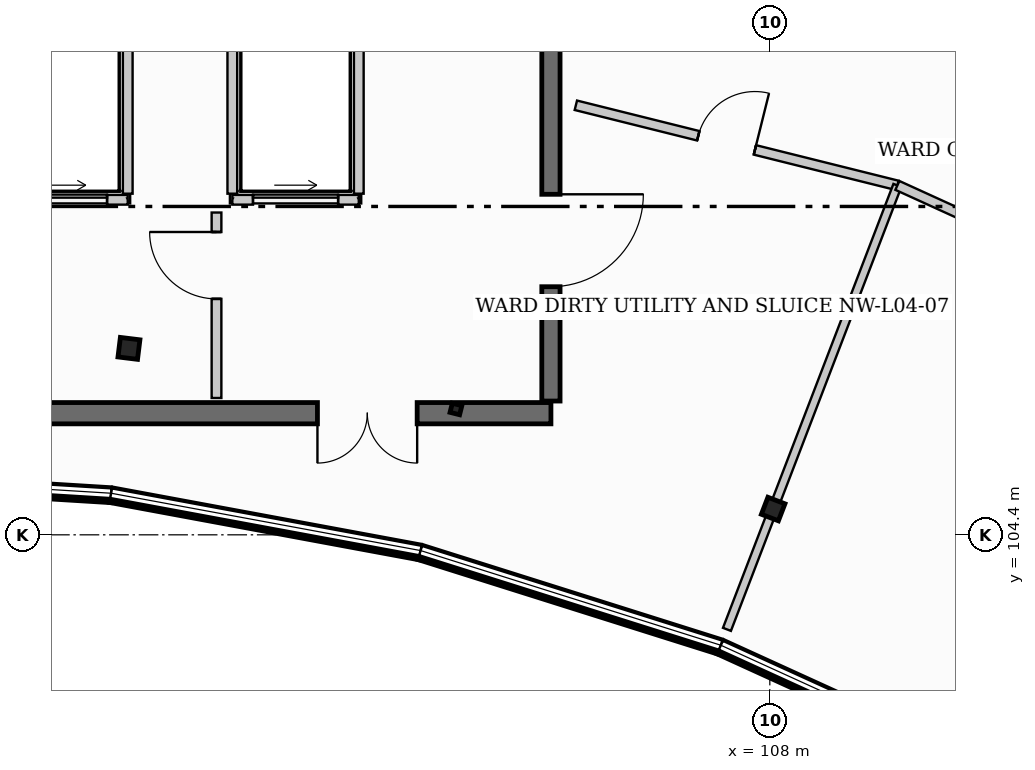
"""IFC4 building model, lengths in metres.
Left out: names, types, materials, properties, quantities, classifications, styles, units other than length and angle.
Written with IfcOpenShell. Run it as: python <this file> out.ifc"""

import sys

from ifc_helpers import new_model, si_unit, direction, frame, frame_2d, origin, origin_2d, place, context, subcontext, project, spatial, rectangle, hollow_rectangle, hollow_circle, i_section, extrude, element, fill, save


model = new_model("IFC4")
c1 = context("Model", 3, precision=1e-05, world=origin(), true_north=direction((0.0, 1.0)))
c2 = subcontext(c1, "Body", "Model", "MODEL_VIEW")
j1 = project(units=[si_unit("LENGTHUNIT", "METRE"), si_unit("PLANEANGLEUNIT", "RADIAN")], contexts=[c1])
p1 = place(None, origin())
s1 = spatial("IfcSite", under=j1, at=p1, CompositionType="ELEMENT")
p2 = place(p1, origin())
s2 = spatial("IfcBuilding", under=s1, at=p2, CompositionType="ELEMENT")
p3 = place(p2, frame((0.0, 0.0, 18.3)))
s3 = spatial("IfcBuildingStorey", under=s2, at=p3, CompositionType="ELEMENT", Elevation=18.3)
p4 = place(p3, frame((97.46, 107.466, 0.0), z_axis=(0.0, 0.0, 1.0), x_axis=(0.121869343405, 0.992546151641, 0.0)))
e1 = element("IfcColumn", 1, at=p4, inside=s3, PredefinedType="COLUMN", context=c2, shape_type="SweptSolid", body=[
    extrude(hollow_circle(Radius=0.162, WallThickness=0.013, at=origin_2d()), origin(), (0.0, 0.0, 1.0), 3.9),
])
p5 = place(p3, frame((102.838, 106.469, 0.0), z_axis=(0.0, 0.0, 1.0), x_axis=(0.2419218956, 0.970295726276, 0.0)))
e2 = element("IfcColumn", 2, at=p5, inside=s3, PredefinedType="COLUMN", context=c2, shape_type="SweptSolid", body=[
    extrude(i_section(OverallWidth=0.154, OverallDepth=0.162, WebThickness=0.008, FlangeThickness=0.011, at=origin_2d()), origin(), (0.0, 0.0, 1.0), 3.9),
])
p6 = place(p3, frame((108.055, 104.824, 0.0), z_axis=(0.0, 0.0, 1.0), x_axis=(0.358367949545, 0.933580426497, 0.0)))
e3 = element("IfcColumn", 3, at=p6, inside=s3, PredefinedType="COLUMN", context=c2, shape_type="SweptSolid", body=[
    extrude(hollow_rectangle(XDim=0.3, YDim=0.3, WallThickness=0.012, at=origin_2d()), origin(), (0.0, 0.0, 1.0), 3.9),
])
p7 = place(p3, frame((104.4, 106.4, 0.0), z_axis=(0.0, 0.0, 1.0), x_axis=(-1.0, 0.0, 0.0)))
e4 = element("IfcWall", 4, at=p7, inside=s3, PredefinedType="SHEAR", context=c2, shape_type="SweptSolid", body=[
    extrude(rectangle(XDim=20.4, YDim=0.35, at=frame_2d((10.2, 0.0))), origin(), (0.0, 0.0, 1.0), 3.9),
])
p8 = place(p7, frame((2.2, 0.0, 0.0)))
e5 = element("IfcOpeningElement", 5, at=p8, cuts=e4, PredefinedType="OPENING", context=c2, shape_type="SweptSolid", body=[
    extrude(rectangle(XDim=1.64, YDim=2.2, at=frame_2d((0.82, 1.1))), frame((0.0, 0.185, 0.0), z_axis=(0.0, -1.0, 0.0), x_axis=(1.0, 0.0, 0.0)), (0.0, 0.0, 1.0), 0.37),
])
p9 = place(p7, frame((13.0, 0.0, 0.0)))
e6 = element("IfcOpeningElement", 6, at=p9, cuts=e4, PredefinedType="OPENING", context=c2, shape_type="SweptSolid", body=[
    extrude(rectangle(XDim=1.52, YDim=2.16, at=frame_2d((0.76, 1.08))), frame((0.0, 0.185, 0.0), z_axis=(0.0, -1.0, 0.0), x_axis=(1.0, 0.0, 0.0)), (0.0, 0.0, 1.0), 0.37),
])
p10 = place(p3, frame((104.4, 117.2, 0.0), z_axis=(0.0, 0.0, 1.0), x_axis=(0.0, -1.0, 0.0)))
e7 = element("IfcWall", 7, at=p10, inside=s3, PredefinedType="SHEAR", context=c2, shape_type="SweptSolid", body=[
    extrude(rectangle(XDim=10.6, YDim=0.3, at=frame_2d((5.3, 0.0))), origin(), (0.0, 0.0, 1.0), 3.9),
])
p11 = place(p10, frame((7.2, 0.0, 0.0)))
e8 = element("IfcOpeningElement", 8, at=p11, cuts=e7, PredefinedType="OPENING", context=c2, shape_type="SweptSolid", body=[
    extrude(rectangle(XDim=1.52, YDim=2.16, at=frame_2d((0.76, 1.08))), frame((0.0, 0.16, 0.0), z_axis=(0.0, -1.0, 0.0), x_axis=(1.0, 0.0, 0.0)), (0.0, 0.0, 1.0), 0.32),
])
for number, where, z_axis, x_axis in (
    (9, (97.167, 105.084, 0.0), (0.0, 0.0, 1.0), (-0.998, 0.061, 0.0)),
    (10, (102.257, 104.141, 0.0), (0.0, 0.0, 1.0), (-0.983, 0.182, 0.0)),
):
    element("IfcWall", number, at=place(p3, frame(where, z_axis=z_axis, x_axis=x_axis)), inside=s3, PredefinedType="STANDARD", context=c2, shape_type="SweptSolid", body=[
        extrude(rectangle(XDim=5.177, YDim=0.22, at=frame_2d((2.588, 0.0))), origin(), (0.0, 0.0, 1.0), 1.05),
    ])
p12 = place(p3, frame((107.195, 102.584, 0.0), z_axis=(0.0, 0.0, 1.0), x_axis=(-0.953706582316, 0.300738681994, 0.0)))
e11 = element("IfcWall", 11, at=p12, inside=s3, PredefinedType="STANDARD", context=c2, shape_type="SweptSolid", body=[
    extrude(rectangle(XDim=5.178, YDim=0.22, at=frame_2d((2.589, 0.0))), origin(), (0.0, 0.0, 1.0), 1.05),
])
p13 = place(p3, frame((111.906, 100.437, 0.0), z_axis=(0.0, 0.0, 1.0), x_axis=(-0.909955822384, 0.414705198074, 0.0)))
e12 = element("IfcWall", 12, at=p13, inside=s3, PredefinedType="STANDARD", context=c2, shape_type="SweptSolid", body=[
    extrude(rectangle(XDim=5.177, YDim=0.22, at=frame_2d((2.588, 0.0))), origin(), (0.0, 0.0, 1.0), 1.05),
])
p14 = place(p3, frame((95.36, 109.91, 0.0), z_axis=(0.0, 0.0, 1.0), x_axis=(1.0, 0.0, 0.0)))
e13 = element("IfcWall", 13, at=p14, inside=s3, PredefinedType="PARTITIONING", context=c2, shape_type="SweptSolid", body=[
    extrude(rectangle(XDim=2.08, YDim=0.16, at=frame_2d((1.04, 0.0))), origin(), (0.0, 0.0, 1.0), 3.54),
])
p15 = place(p14, frame((0.34, 0.0, 0.0)))
e14 = element("IfcOpeningElement", 14, at=p15, cuts=e13, PredefinedType="OPENING", context=c2, shape_type="SweptSolid", body=[
    extrude(rectangle(XDim=1.4, YDim=2.2, at=frame_2d((0.7, 1.1))), frame((0.0, 0.09, 0.0), z_axis=(0.0, -1.0, 0.0), x_axis=(1.0, 0.0, 0.0)), (0.0, 0.0, 1.0), 0.18),
])
p16 = place(p3, frame((97.44, 110.01, 0.0), z_axis=(0.0, 0.0, 1.0), x_axis=(0.0, 1.0, 0.0)))
e15 = element("IfcWall", 15, at=p16, inside=s3, PredefinedType="PARTITIONING", context=c2, shape_type="SweptSolid", body=[
    extrude(rectangle(XDim=2.78, YDim=0.16, at=frame_2d((1.39, 0.0))), origin(), (0.0, 0.0, 1.0), 3.54),
])
p17 = place(p3, frame((99.16, 109.91, 0.0), z_axis=(0.0, 0.0, 1.0), x_axis=(1.0, 0.0, 0.0)))
e16 = element("IfcWall", 16, at=p17, inside=s3, PredefinedType="PARTITIONING", context=c2, shape_type="SweptSolid", body=[
    extrude(rectangle(XDim=2.08, YDim=0.16, at=frame_2d((1.04, 0.0))), origin(), (0.0, 0.0, 1.0), 3.54),
])
p18 = place(p17, frame((0.34, 0.0, 0.0)))
e17 = element("IfcOpeningElement", 17, at=p18, cuts=e16, PredefinedType="OPENING", context=c2, shape_type="SweptSolid", body=[
    extrude(rectangle(XDim=1.4, YDim=2.2, at=frame_2d((0.7, 1.1))), frame((0.0, 0.09, 0.0), z_axis=(0.0, -1.0, 0.0), x_axis=(1.0, 0.0, 0.0)), (0.0, 0.0, 1.0), 0.18),
])
for number, where, z_axis, x_axis in (
    (18, (99.16, 112.79, 0.0), (0.0, 0.0, 1.0), (0.0, -1.0, 0.0)),
    (19, (101.24, 110.01, 0.0), (0.0, 0.0, 1.0), (0.0, 1.0, 0.0)),
):
    element("IfcWall", number, at=place(p3, frame(where, z_axis=z_axis, x_axis=x_axis)), inside=s3, PredefinedType="PARTITIONING", context=c2, shape_type="SweptSolid", body=[
        extrude(rectangle(XDim=2.78, YDim=0.16, at=frame_2d((1.39, 0.0))), origin(), (0.0, 0.0, 1.0), 3.54),
    ])
p19 = place(p3, frame((98.9, 106.65, 0.0), z_axis=(0.0, 0.0, 1.0), x_axis=(0.0, 1.0, 0.0)))
e20 = element("IfcWall", 20, at=p19, inside=s3, PredefinedType="PARTITIONING", context=c2, shape_type="SweptSolid", body=[
    extrude(rectangle(XDim=3.05, YDim=0.16, at=frame_2d((1.525, 0.0))), origin(), (0.0, 0.0, 1.0), 3.295),
])
p20 = place(p19, frame((1.63, 0.0, 0.0)))
e21 = element("IfcOpeningElement", 21, at=p20, cuts=e20, PredefinedType="OPENING", context=c2, shape_type="SweptSolid", body=[
    extrude(rectangle(XDim=1.1, YDim=2.15, at=frame_2d((0.55, 1.075))), frame((0.0, 0.09, 0.0), z_axis=(0.0, -1.0, 0.0), x_axis=(1.0, 0.0, 0.0)), (0.0, 0.0, 1.0), 0.18),
])
p21 = place(p3, frame((104.81, 111.464, 0.0), z_axis=(0.0, 0.0, 1.0), x_axis=(0.970308293834, -0.241871484298, 0.0)))
e22 = element("IfcWall", 22, at=p21, inside=s3, PredefinedType="PARTITIONING", context=c2, shape_type="SweptSolid", body=[
    extrude(rectangle(XDim=5.45, YDim=0.16, at=frame_2d((2.725, 0.0))), origin(), (0.0, 0.0, 1.0), 3.088),
])
p22 = place(p21, frame((2.075, 0.0, 0.0)))
e23 = element("IfcOpeningElement", 23, at=p22, cuts=e22, PredefinedType="OPENING", context=c2, shape_type="SweptSolid", body=[
    extrude(rectangle(XDim=0.96, YDim=2.06, at=frame_2d((0.48, 1.03))), frame((0.0, 0.09, 0.0), z_axis=(0.0, -1.0, 0.0), x_axis=(1.0, 0.0, 0.0)), (0.0, 0.0, 1.0), 0.18),
])
p23 = place(p3, frame((110.098, 110.146, 0.0), z_axis=(0.0, 0.0, 1.0), x_axis=(-0.358410014332, -0.933564278251, 0.0)))
e24 = element("IfcWall", 24, at=p23, inside=s3, PredefinedType="PARTITIONING", context=c2, shape_type="SweptSolid", body=[
    extrude(rectangle(XDim=7.821, YDim=0.14, at=frame_2d((3.91, 0.0))), origin(), (0.0, 0.0, 1.0), 3.088),
])
p24 = place(p3, frame((110.098, 110.146, 0.0), z_axis=(0.0, 0.0, 1.0), x_axis=(0.909942329762, -0.414734802623, 0.0)))
e25 = element("IfcWall", 25, at=p24, inside=s3, PredefinedType="PARTITIONING", context=c2, shape_type="SweptSolid", body=[
    extrude(rectangle(XDim=4.065, YDim=0.16, at=frame_2d((2.033, 0.0))), origin(), (0.0, 0.0, 1.0), 3.088),
])
p25 = place(p24, frame((1.383, 0.0, 0.0)))
e26 = element("IfcOpeningElement", 26, at=p25, cuts=e25, PredefinedType="OPENING", context=c2, shape_type="SweptSolid", body=[
    extrude(rectangle(XDim=1.62, YDim=2.3, at=frame_2d((0.81, 1.15))), frame((0.0, 0.09, 0.0), z_axis=(0.0, -1.0, 0.0), x_axis=(1.0, 0.0, 0.0)), (0.0, 0.0, 1.0), 0.18),
])
p26 = place(p15, origin())
e27 = element("IfcDoor", 27, at=p26, inside=s3, OperationType="SLIDING_TO_RIGHT", PredefinedType="DOOR", context=c2, shape_type="SweptSolid", body=[
    extrude(rectangle(XDim=1.4, YDim=2.2, at=frame_2d((0.7, 1.1))), frame((0.0, 0.025, 0.0), z_axis=(0.0, -1.0, 0.0), x_axis=(1.0, 0.0, 0.0)), (0.0, 0.0, 1.0), 0.05),
])
fill(e14, e27)
p27 = place(p18, origin())
e28 = element("IfcDoor", 28, at=p27, inside=s3, OperationType="SLIDING_TO_RIGHT", PredefinedType="DOOR", context=c2, shape_type="SweptSolid", body=[
    extrude(rectangle(XDim=1.4, YDim=2.2, at=frame_2d((0.7, 1.1))), frame((0.0, 0.025, 0.0), z_axis=(0.0, -1.0, 0.0), x_axis=(1.0, 0.0, 0.0)), (0.0, 0.0, 1.0), 0.05),
])
fill(e17, e28)
p28 = place(p8, origin())
e29 = element("IfcDoor", 29, at=p28, inside=s3, OperationType="DOUBLE_DOOR_SINGLE_SWING", PredefinedType="DOOR", context=c2, shape_type="SweptSolid", body=[
    extrude(rectangle(XDim=1.64, YDim=2.2, at=frame_2d((0.82, 1.1))), frame((0.0, 0.025, 0.0), z_axis=(0.0, -1.0, 0.0), x_axis=(1.0, 0.0, 0.0)), (0.0, 0.0, 1.0), 0.05),
])
fill(e5, e29)
p29 = place(p11, origin())
e30 = element("IfcDoor", 30, at=p29, inside=s3, OperationType="SINGLE_SWING_LEFT", PredefinedType="DOOR", context=c2, shape_type="SweptSolid", body=[
    extrude(rectangle(XDim=1.52, YDim=2.16, at=frame_2d((0.76, 1.08))), frame((0.0, 0.025, 0.0), z_axis=(0.0, -1.0, 0.0), x_axis=(1.0, 0.0, 0.0)), (0.0, 0.0, 1.0), 0.05),
])
fill(e8, e30)
p30 = place(p20, origin())
e31 = element("IfcDoor", 31, at=p30, inside=s3, OperationType="SINGLE_SWING_RIGHT", PredefinedType="DOOR", context=c2, shape_type="SweptSolid", body=[
    extrude(rectangle(XDim=1.1, YDim=2.15, at=frame_2d((0.55, 1.075))), frame((0.0, 0.025, 0.0), z_axis=(0.0, -1.0, 0.0), x_axis=(1.0, 0.0, 0.0)), (0.0, 0.0, 1.0), 0.05),
])
fill(e21, e31)
p31 = place(p22, origin())
e32 = element("IfcDoor", 32, at=p31, inside=s3, OperationType="SINGLE_SWING_RIGHT", PredefinedType="DOOR", context=c2, shape_type="SweptSolid", body=[
    extrude(rectangle(XDim=0.96, YDim=2.06, at=frame_2d((0.48, 1.03))), frame((0.0, 0.025, 0.0), z_axis=(0.0, -1.0, 0.0), x_axis=(1.0, 0.0, 0.0)), (0.0, 0.0, 1.0), 0.05),
])
fill(e23, e32)
save(model, sys.argv[1])
